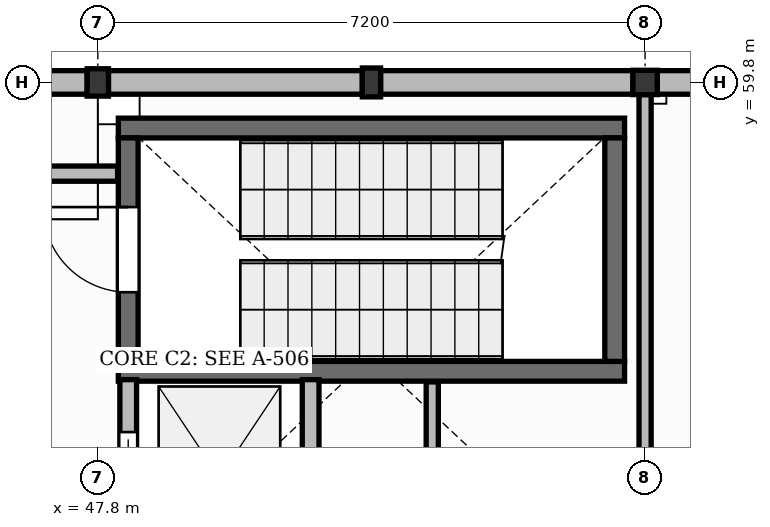
"""IFC4 building model, lengths in metres.
Left out: names, types, materials, properties, quantities, classifications, styles, units other than length and angle.
Written with IfcOpenShell. Run it as: python <this file> out.ifc"""

import sys

from ifc_helpers import new_model, si_unit, direction, frame, frame_2d, origin, origin_2d, place, context, subcontext, project, spatial, rectangle, extrude, element, fill, save


model = new_model("IFC4")
c1 = context("Model", 3, precision=1e-05, world=origin(), true_north=direction((0.0, 1.0)))
c2 = subcontext(c1, "Body", "Model", "MODEL_VIEW")
j1 = project(units=[si_unit("LENGTHUNIT", "METRE"), si_unit("PLANEANGLEUNIT", "RADIAN")], contexts=[c1])
p1 = place(None, origin())
s1 = spatial("IfcSite", under=j1, at=p1, CompositionType="ELEMENT")
p2 = place(p1, origin())
s2 = spatial("IfcBuilding", under=s1, at=p2, CompositionType="ELEMENT")
p3 = place(p2, frame((0.0, 0.0, 9.0)))
s3 = spatial("IfcBuildingStorey", under=s2, at=p3, CompositionType="ELEMENT", Elevation=9.0)
p4 = place(p3, frame((47.8, 59.8, 0.0), z_axis=(0.0, 0.0, 1.0), x_axis=(1.0, 0.0, 0.0)))
e1 = element("IfcColumn", 1, at=p4, inside=s3, PredefinedType="COLUMN", context=c2, shape_type="SweptSolid", body=[
    extrude(rectangle(XDim=0.28, YDim=0.36, at=origin_2d()), origin(), (0.0, 0.0, 1.0), 3.99),
])
p5 = place(p3, frame((55.0, 59.8, 0.0), z_axis=(0.0, 0.0, 1.0), x_axis=(1.0, 0.0, 0.0)))
e2 = element("IfcColumn", 2, at=p5, inside=s3, PredefinedType="COLUMN", context=c2, shape_type="SweptSolid", body=[
    extrude(rectangle(XDim=0.32, YDim=0.32, at=origin_2d()), origin(), (0.0, 0.0, 1.0), 3.99),
])
p6 = place(p3, frame((51.4, 59.8, 0.0), z_axis=(0.0, 0.0, 1.0), x_axis=(1.0, 0.0, 0.0)))
e3 = element("IfcColumn", 3, at=p6, inside=s3, PredefinedType="PILASTER", context=c2, shape_type="SweptSolid", body=[
    extrude(rectangle(XDim=0.24, YDim=0.38, at=origin_2d()), origin(), (0.0, 0.0, 1.0), 3.99),
])
p7 = place(p3, frame((40.76, 59.8, 0.0), z_axis=(0.0, 0.0, 1.0), x_axis=(1.0, 0.0, 0.0)))
e4 = element("IfcWall", 4, at=p7, inside=s3, PredefinedType="SOLIDWALL", context=c2, shape_type="SweptSolid", body=[
    extrude(rectangle(XDim=6.9, YDim=0.31, at=frame_2d((3.45, 0.0))), origin(), (0.0, 0.0, 1.0), 3.53),
])
p8 = place(p7, frame((1.02, 0.0, 1.05)))
e5 = element("IfcOpeningElement", 5, at=p8, cuts=e4, PredefinedType="OPENING", context=c2, shape_type="SweptSolid", body=[
    extrude(rectangle(XDim=1.12, YDim=1.65, at=frame_2d((0.56, 0.825))), frame((0.0, 0.165, 0.0), z_axis=(0.0, -1.0, 0.0), x_axis=(1.0, 0.0, 0.0)), (0.0, 0.0, 1.0), 0.33),
])
p9 = place(p7, frame((3.87, 0.0, 1.0)))
e6 = element("IfcOpeningElement", 6, at=p9, cuts=e4, PredefinedType="OPENING", context=c2, shape_type="SweptSolid", body=[
    extrude(rectangle(XDim=2.08, YDim=1.8, at=frame_2d((1.04, 0.9))), frame((0.0, 0.165, 0.0), z_axis=(0.0, -1.0, 0.0), x_axis=(1.0, 0.0, 0.0)), (0.0, 0.0, 1.0), 0.33),
])
p10 = place(p3, frame((47.94, 59.8, 0.0), z_axis=(0.0, 0.0, 1.0), x_axis=(1.0, 0.0, 0.0)))
e7 = element("IfcWall", 7, at=p10, inside=s3, PredefinedType="SOLIDWALL", context=c2, shape_type="SweptSolid", body=[
    extrude(rectangle(XDim=3.34, YDim=0.31, at=frame_2d((1.67, 0.0))), origin(), (0.0, 0.0, 1.0), 3.53),
])
p11 = place(p3, frame((51.52, 59.8, 0.0), z_axis=(0.0, 0.0, 1.0), x_axis=(1.0, 0.0, 0.0)))
e8 = element("IfcWall", 8, at=p11, inside=s3, PredefinedType="SOLIDWALL", context=c2, shape_type="SweptSolid", body=[
    extrude(rectangle(XDim=3.32, YDim=0.31, at=frame_2d((1.66, 0.0))), origin(), (0.0, 0.0, 1.0), 3.53),
])
p12 = place(p3, frame((55.16, 59.8, 0.0), z_axis=(0.0, 0.0, 1.0), x_axis=(1.0, 0.0, 0.0)))
e9 = element("IfcWall", 9, at=p12, inside=s3, PredefinedType="SOLIDWALL", context=c2, shape_type="SweptSolid", body=[
    extrude(rectangle(XDim=3.32, YDim=0.31, at=frame_2d((1.66, 0.0))), origin(), (0.0, 0.0, 1.0), 3.52),
])
p13 = place(p12, frame((0.935, 0.0, 1.35)))
e10 = element("IfcOpeningElement", 10, at=p13, cuts=e9, PredefinedType="OPENING", context=c2, shape_type="SweptSolid", body=[
    extrude(rectangle(XDim=1.45, YDim=1.4, at=frame_2d((0.725, 0.7))), frame((0.0, 0.165, 0.0), z_axis=(0.0, -1.0, 0.0), x_axis=(1.0, 0.0, 0.0)), (0.0, 0.0, 1.0), 0.33),
])
for number, where, z_axis, x_axis in (
    (11, (48.07, 56.0, 0.0), (0.0, 0.0, 1.0), (1.0, 0.0, 0.0)),
    (12, (48.07, 59.2, 0.0), (0.0, 0.0, 1.0), (1.0, 0.0, 0.0)),
):
    element("IfcWall", number, at=place(p3, frame(where, z_axis=z_axis, x_axis=x_axis)), inside=s3, PredefinedType="SHEAR", context=c2, shape_type="SweptSolid", body=[
        extrude(rectangle(XDim=6.66, YDim=0.26, at=frame_2d((3.33, 0.0))), origin(), (0.0, 0.0, 1.0), 3.95),
    ])
p14 = place(p3, frame((48.2, 56.13, 0.0), z_axis=(0.0, 0.0, 1.0), x_axis=(0.0, 1.0, 0.0)))
e13 = element("IfcWall", 13, at=p14, inside=s3, PredefinedType="SHEAR", context=c2, shape_type="SweptSolid", body=[
    extrude(rectangle(XDim=2.94, YDim=0.26, at=frame_2d((1.47, 0.0))), origin(), (0.0, 0.0, 1.0), 3.95),
])
p15 = place(p14, frame((0.91, 0.0, 0.0)))
e14 = element("IfcOpeningElement", 14, at=p15, cuts=e13, PredefinedType="OPENING", context=c2, shape_type="SweptSolid", body=[
    extrude(rectangle(XDim=1.12, YDim=2.1, at=frame_2d((0.56, 1.05))), frame((0.0, 0.14, 0.0), z_axis=(0.0, -1.0, 0.0), x_axis=(1.0, 0.0, 0.0)), (0.0, 0.0, 1.0), 0.28),
])
p16 = place(p3, frame((54.6, 56.13, 0.0), z_axis=(0.0, 0.0, 1.0), x_axis=(0.0, 1.0, 0.0)))
e15 = element("IfcWall", 15, at=p16, inside=s3, PredefinedType="SHEAR", context=c2, shape_type="SweptSolid", body=[
    extrude(rectangle(XDim=2.94, YDim=0.26, at=frame_2d((1.47, 0.0))), origin(), (0.0, 0.0, 1.0), 3.95),
])
p17 = place(p3, frame((48.2, 53.31, 0.0), z_axis=(0.0, 0.0, 1.0), x_axis=(0.0, 1.0, 0.0)))
e16 = element("IfcWall", 16, at=p17, inside=s3, PredefinedType="SOLIDWALL", context=c2, shape_type="SweptSolid", body=[
    extrude(rectangle(XDim=2.58, YDim=0.22, at=frame_2d((1.29, 0.0))), origin(), (0.0, 0.0, 1.0), 3.95),
])
p18 = place(p17, frame((0.69, 0.0, 0.0)))
e17 = element("IfcOpeningElement", 17, at=p18, cuts=e16, PredefinedType="OPENING", context=c2, shape_type="SweptSolid", body=[
    extrude(rectangle(XDim=1.2, YDim=2.15, at=frame_2d((0.6, 1.075))), frame((0.0, 0.12, 0.0), z_axis=(0.0, -1.0, 0.0), x_axis=(1.0, 0.0, 0.0)), (0.0, 0.0, 1.0), 0.24),
])
p19 = place(p3, frame((50.6, 53.31, 0.0), z_axis=(0.0, 0.0, 1.0), x_axis=(0.0, 1.0, 0.0)))
e18 = element("IfcWall", 18, at=p19, inside=s3, PredefinedType="SOLIDWALL", context=c2, shape_type="SweptSolid", body=[
    extrude(rectangle(XDim=2.58, YDim=0.22, at=frame_2d((1.29, 0.0))), origin(), (0.0, 0.0, 1.0), 3.95),
])
p20 = place(p3, frame((52.2, 53.27, 0.0), z_axis=(0.0, 0.0, 1.0), x_axis=(0.0, 1.0, 0.0)))
e19 = element("IfcWall", 19, at=p20, inside=s3, PredefinedType="PARTITIONING", context=c2, shape_type="SweptSolid", body=[
    extrude(rectangle(XDim=2.59, YDim=0.16, at=frame_2d((1.295, 0.0))), origin(), (0.0, 0.0, 1.0), 3.96),
])
p21 = place(p3, frame((48.06, 58.6, 0.0), z_axis=(0.0, 0.0, 1.0), x_axis=(-1.0, 0.0, 0.0)))
e20 = element("IfcWall", 20, at=p21, inside=s3, PredefinedType="PARTITIONING", context=c2, shape_type="SweptSolid", body=[
    extrude(rectangle(XDim=4.26, YDim=0.2, at=frame_2d((2.13, 0.0))), origin(), (0.0, 0.0, 1.0), 3.96),
])
p22 = place(p3, frame((55.0, 53.27, 0.0), z_axis=(0.0, 0.0, 1.0), x_axis=(0.0, 1.0, 0.0)))
e21 = element("IfcWall", 21, at=p22, inside=s3, PredefinedType="PARTITIONING", context=c2, shape_type="SweptSolid", body=[
    extrude(rectangle(XDim=6.37, YDim=0.16, at=frame_2d((3.185, 0.0))), origin(), (0.0, 0.0, 1.0), 3.47),
])
p23 = place(p18, origin())
e22 = element("IfcDoor", 22, at=p23, inside=s3, OperationType="SLIDING_TO_LEFT", PredefinedType="DOOR", context=c2, shape_type="SweptSolid", body=[
    extrude(rectangle(XDim=1.2, YDim=2.15, at=frame_2d((0.6, 1.075))), frame((0.0, 0.025, 0.0), z_axis=(0.0, -1.0, 0.0), x_axis=(1.0, 0.0, 0.0)), (0.0, 0.0, 1.0), 0.05),
])
fill(e17, e22)
p24 = place(p15, origin())
e23 = element("IfcDoor", 23, at=p24, inside=s3, OperationType="SINGLE_SWING_RIGHT", PredefinedType="DOOR", context=c2, shape_type="SweptSolid", body=[
    extrude(rectangle(XDim=1.12, YDim=2.1, at=frame_2d((0.56, 1.05))), frame((0.0, 0.025, 0.0), z_axis=(0.0, -1.0, 0.0), x_axis=(1.0, 0.0, 0.0)), (0.0, 0.0, 1.0), 0.05),
])
fill(e14, e23)
save(model, sys.argv[1])
